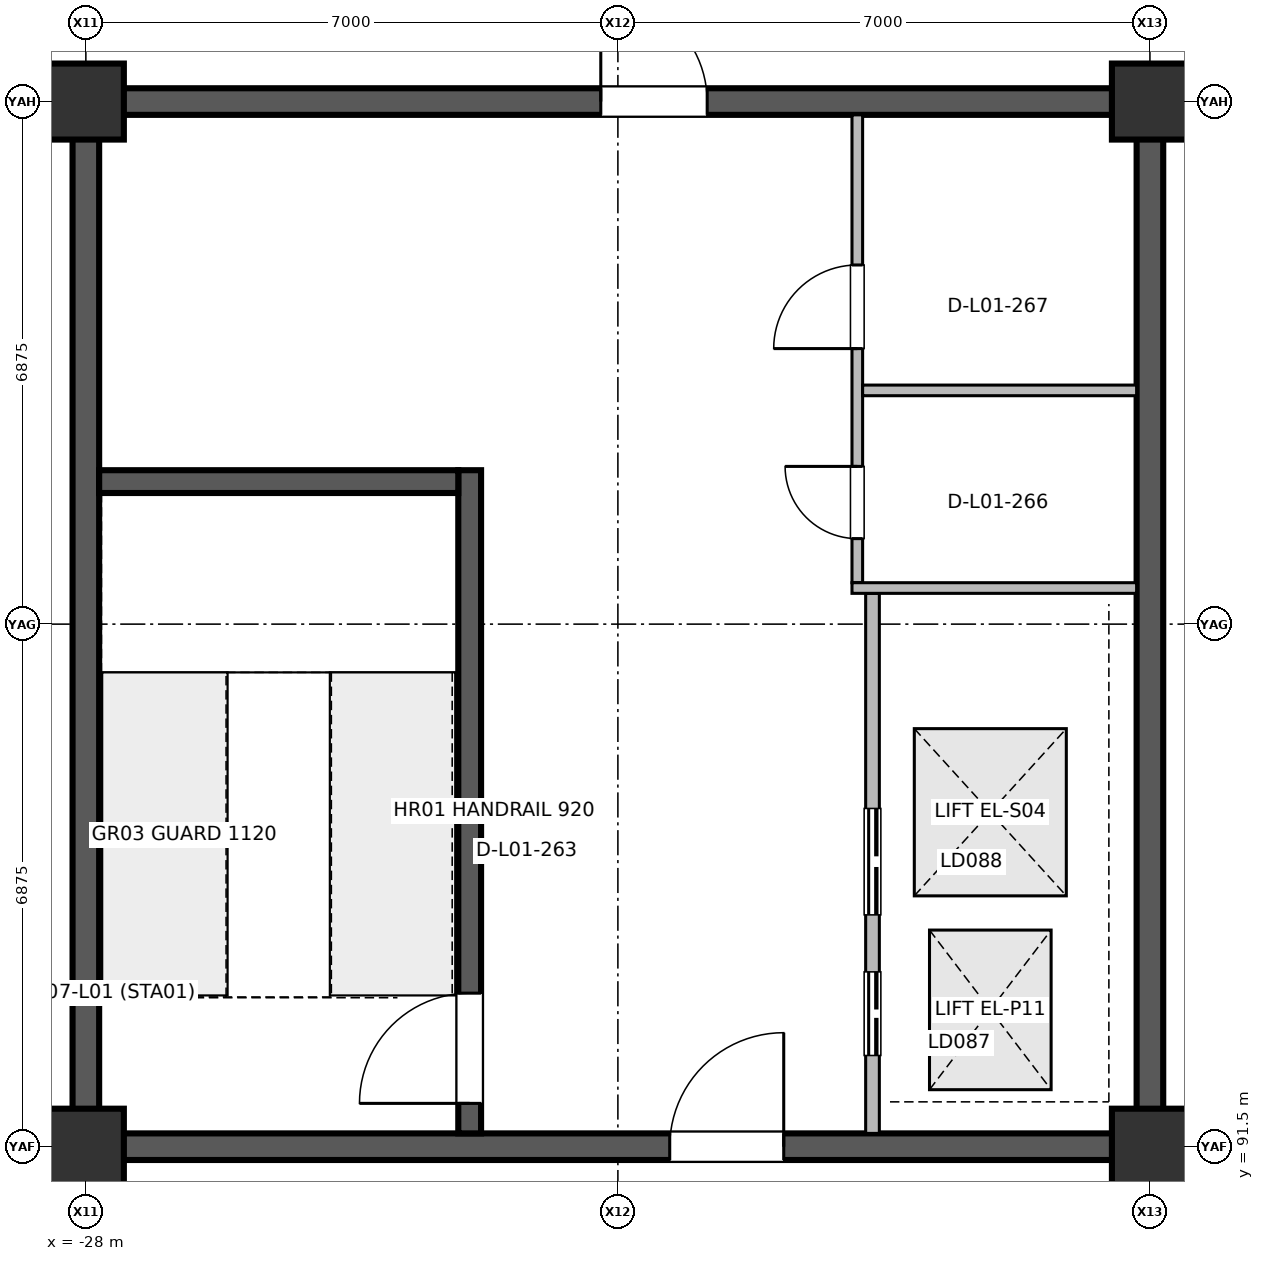
"""IFC4 building model, lengths in metres.
Left out: names, types, materials, properties, quantities, classifications, styles, units other than length and angle.
Written with IfcOpenShell. Run it as: python <this file> out.ifc"""

import sys

from ifc_helpers import new_model, si_unit, direction, frame, frame_2d, origin, origin_2d, place, context, subcontext, project, spatial, rectangle, circle, extrude, element, fill, save


model = new_model("IFC4")
c1 = context("Model", 3, precision=1e-05, world=origin(), true_north=direction((0.0, 1.0)))
c2 = subcontext(c1, "Body", "Model", "MODEL_VIEW")
j1 = project(units=[si_unit("LENGTHUNIT", "METRE"), si_unit("PLANEANGLEUNIT", "RADIAN")], contexts=[c1])
p1 = place(None, origin())
s1 = spatial("IfcSite", under=j1, at=p1, CompositionType="ELEMENT")
p2 = place(p1, origin())
s2 = spatial("IfcBuilding", under=s1, at=p2, CompositionType="ELEMENT")
p3 = place(p2, origin())
s3 = spatial("IfcBuildingStorey", under=s2, at=p3, CompositionType="ELEMENT", Elevation=0.0)
for number, where, z_axis, x_axis in (
    (1, (-28.0, 91.5, 0.0), (0.0, 0.0, 1.0), (1.0, 0.0, 0.0)),
    (2, (-28.0, 105.25, 0.0), (0.0, 0.0, 1.0), (1.0, 0.0, 0.0)),
    (3, (-14.0, 91.5, 0.0), (0.0, 0.0, 1.0), (1.0, 0.0, 0.0)),
    (4, (-14.0, 105.25, 0.0), (0.0, 0.0, 1.0), (1.0, 0.0, 0.0)),
):
    element("IfcColumn", number, at=place(p3, frame(where, z_axis=z_axis, x_axis=x_axis)), inside=s3, PredefinedType="COLUMN", context=c2, shape_type="SweptSolid", body=[
        extrude(circle(Radius=0.5, at=origin_2d()), origin(), (0.0, 0.0, 1.0), 5.998),
    ])
for number, where, z_axis, x_axis in (
    (5, (-28.0, 91.675, 0.0), (0.0, 0.0, 1.0), (0.0, 1.0, 0.0)),
    (6, (-14.0, 91.675, 0.0), (0.0, 0.0, 1.0), (0.0, 1.0, 0.0)),
):
    element("IfcWall", number, at=place(p3, frame(where, z_axis=z_axis, x_axis=x_axis)), inside=s3, PredefinedType="SHEAR", context=c2, shape_type="SweptSolid", body=[
        extrude(rectangle(XDim=13.4, YDim=0.35, at=frame_2d((6.7, 0.0))), origin(), (0.0, 0.0, 1.0), 5.78),
    ])
p4 = place(p3, frame((-27.825, 91.5, 0.0), z_axis=(0.0, 0.0, 1.0), x_axis=(1.0, 0.0, 0.0)))
e7 = element("IfcWall", 7, at=p4, inside=s3, PredefinedType="SHEAR", context=c2, shape_type="SweptSolid", body=[
    extrude(rectangle(XDim=13.65, YDim=0.35, at=frame_2d((6.825, 0.0))), origin(), (0.0, 0.0, 1.0), 5.78),
])
p5 = place(p4, frame((7.507, 0.0, 0.0)))
e8 = element("IfcOpeningElement", 8, at=p5, cuts=e7, PredefinedType="OPENING", context=c2, shape_type="SweptSolid", body=[
    extrude(rectangle(XDim=1.5, YDim=2.2, at=frame_2d((0.75, 1.1))), frame((0.0, 0.185, 0.0), z_axis=(0.0, -1.0, 0.0), x_axis=(1.0, 0.0, 0.0)), (0.0, 0.0, 1.0), 0.37),
])
p6 = place(p3, frame((-27.825, 105.25, 0.0), z_axis=(0.0, 0.0, 1.0), x_axis=(1.0, 0.0, 0.0)))
e9 = element("IfcWall", 9, at=p6, inside=s3, PredefinedType="SHEAR", context=c2, shape_type="SweptSolid", body=[
    extrude(rectangle(XDim=13.65, YDim=0.35, at=frame_2d((6.825, 0.0))), origin(), (0.0, 0.0, 1.0), 5.78),
])
p7 = place(p6, frame((6.6, 0.0, 0.0)))
e10 = element("IfcOpeningElement", 10, at=p7, cuts=e9, PredefinedType="OPENING", context=c2, shape_type="SweptSolid", body=[
    extrude(rectangle(XDim=1.4, YDim=2.2, at=frame_2d((0.7, 1.1))), frame((0.0, 0.185, 0.0), z_axis=(0.0, -1.0, 0.0), x_axis=(1.0, 0.0, 0.0)), (0.0, 0.0, 1.0), 0.37),
])
p8 = place(p3, frame((-22.95, 91.675, 0.0), z_axis=(0.0, 0.0, 1.0), x_axis=(0.0, 1.0, 0.0)))
e11 = element("IfcWall", 11, at=p8, inside=s3, PredefinedType="SHEAR", context=c2, shape_type="SweptSolid", body=[
    extrude(rectangle(XDim=8.725, YDim=0.3, at=frame_2d((4.362, 0.0))), origin(), (0.0, 0.0, 1.0), 5.78),
])
p9 = place(p8, frame((0.395, 0.0, 0.0)))
e12 = element("IfcOpeningElement", 12, at=p9, cuts=e11, PredefinedType="OPENING", context=c2, shape_type="SweptSolid", body=[
    extrude(rectangle(XDim=1.45, YDim=2.2, at=frame_2d((0.725, 1.1))), frame((0.0, 0.16, 0.0), z_axis=(0.0, -1.0, 0.0), x_axis=(1.0, 0.0, 0.0)), (0.0, 0.0, 1.0), 0.32),
])
p10 = place(p3, frame((-17.65, 91.675, 0.0), z_axis=(0.0, 0.0, 1.0), x_axis=(0.0, 1.0, 0.0)))
e13 = element("IfcWall", 13, at=p10, inside=s3, PredefinedType="PARTITIONING", context=c2, shape_type="SweptSolid", body=[
    extrude(rectangle(XDim=7.105, YDim=0.18, at=frame_2d((3.552, 0.0))), origin(), (0.0, 0.0, 1.0), 5.02),
])
p11 = place(p10, frame((1.025, 0.0, 0.0)))
e14 = element("IfcOpeningElement", 14, at=p11, cuts=e13, PredefinedType="OPENING", context=c2, shape_type="SweptSolid", body=[
    extrude(rectangle(XDim=1.1, YDim=2.2, at=frame_2d((0.55, 1.1))), frame((0.0, 0.1, 0.0), z_axis=(0.0, -1.0, 0.0), x_axis=(1.0, 0.0, 0.0)), (0.0, 0.0, 1.0), 0.2),
])
p12 = place(p10, frame((2.875, 0.0, 0.0)))
e15 = element("IfcOpeningElement", 15, at=p12, cuts=e13, PredefinedType="OPENING", context=c2, shape_type="SweptSolid", body=[
    extrude(rectangle(XDim=1.4, YDim=2.3, at=frame_2d((0.7, 1.15))), frame((0.0, 0.1, 0.0), z_axis=(0.0, -1.0, 0.0), x_axis=(1.0, 0.0, 0.0)), (0.0, 0.0, 1.0), 0.2),
])
p13 = place(p3, frame((-17.85, 98.92, 0.0), z_axis=(0.0, 0.0, 1.0), x_axis=(0.0, 1.0, 0.0)))
e16 = element("IfcWall", 16, at=p13, inside=s3, PredefinedType="PARTITIONING", context=c2, shape_type="SweptSolid", body=[
    extrude(rectangle(XDim=6.155, YDim=0.14, at=frame_2d((3.078, 0.0))), origin(), (0.0, 0.0, 1.0), 5.02),
])
p14 = place(p13, frame((0.58, 0.0, 0.0)))
e17 = element("IfcOpeningElement", 17, at=p14, cuts=e16, PredefinedType="OPENING", context=c2, shape_type="SweptSolid", body=[
    extrude(rectangle(XDim=0.95, YDim=2.15, at=frame_2d((0.475, 1.075))), frame((0.0, 0.08, 0.0), z_axis=(0.0, -1.0, 0.0), x_axis=(1.0, 0.0, 0.0)), (0.0, 0.0, 1.0), 0.16),
])
p15 = place(p13, frame((3.08, 0.0, 0.0)))
e18 = element("IfcOpeningElement", 18, at=p15, cuts=e16, PredefinedType="OPENING", context=c2, shape_type="SweptSolid", body=[
    extrude(rectangle(XDim=1.1, YDim=2.15, at=frame_2d((0.55, 1.075))), frame((0.0, 0.08, 0.0), z_axis=(0.0, -1.0, 0.0), x_axis=(1.0, 0.0, 0.0)), (0.0, 0.0, 1.0), 0.16),
])
p16 = place(p3, frame((-17.92, 98.85, 0.0), z_axis=(0.0, 0.0, 1.0), x_axis=(1.0, 0.0, 0.0)))
e19 = element("IfcWall", 19, at=p16, inside=s3, PredefinedType="PARTITIONING", context=c2, shape_type="SweptSolid", body=[
    extrude(rectangle(XDim=3.745, YDim=0.14, at=frame_2d((1.873, 0.0))), origin(), (0.0, 0.0, 1.0), 5.02),
])
p17 = place(p3, frame((-17.78, 101.45, 0.0), z_axis=(0.0, 0.0, 1.0), x_axis=(1.0, 0.0, 0.0)))
e20 = element("IfcWall", 20, at=p17, inside=s3, PredefinedType="PARTITIONING", context=c2, shape_type="SweptSolid", body=[
    extrude(rectangle(XDim=3.605, YDim=0.14, at=frame_2d((1.802, 0.0))), origin(), (0.0, 0.0, 1.0), 5.02),
])
p18 = place(p3, frame((-27.825, 100.25, 0.0), z_axis=(0.0, 0.0, 1.0), x_axis=(1.0, 0.0, 0.0)))
e21 = element("IfcWall", 21, at=p18, inside=s3, PredefinedType="SHEAR", context=c2, shape_type="SweptSolid", body=[
    extrude(rectangle(XDim=4.725, YDim=0.3, at=frame_2d((2.362, 0.0))), origin(), (0.0, 0.0, 1.0), 5.78),
])
p19 = place(p7, origin())
e22 = element("IfcDoor", 22, at=p19, inside=s3, OperationType="SINGLE_SWING_LEFT", PredefinedType="DOOR", context=c2, shape_type="SweptSolid", body=[
    extrude(rectangle(XDim=1.4, YDim=2.2, at=frame_2d((0.7, 1.1))), frame((0.0, 0.025, 0.0), z_axis=(0.0, -1.0, 0.0), x_axis=(1.0, 0.0, 0.0)), (0.0, 0.0, 1.0), 0.05),
])
fill(e10, e22)
p20 = place(p5, origin())
e23 = element("IfcDoor", 23, at=p20, inside=s3, OperationType="SINGLE_SWING_RIGHT", PredefinedType="DOOR", context=c2, shape_type="SweptSolid", body=[
    extrude(rectangle(XDim=1.5, YDim=2.2, at=frame_2d((0.75, 1.1))), frame((0.0, 0.025, 0.0), z_axis=(0.0, -1.0, 0.0), x_axis=(1.0, 0.0, 0.0)), (0.0, 0.0, 1.0), 0.05),
])
fill(e8, e23)
p21 = place(p9, origin())
e24 = element("IfcDoor", 24, at=p21, inside=s3, OperationType="SINGLE_SWING_LEFT", PredefinedType="DOOR", context=c2, shape_type="SweptSolid", body=[
    extrude(rectangle(XDim=1.45, YDim=2.2, at=frame_2d((0.725, 1.1))), frame((0.0, 0.025, 0.0), z_axis=(0.0, -1.0, 0.0), x_axis=(1.0, 0.0, 0.0)), (0.0, 0.0, 1.0), 0.05),
])
fill(e12, e24)
p22 = place(p11, origin())
e25 = element("IfcDoor", 25, at=p22, inside=s3, OperationType="DOUBLE_DOOR_SLIDING", PredefinedType="DOOR", context=c2, shape_type="SweptSolid", body=[
    extrude(rectangle(XDim=1.1, YDim=2.2, at=frame_2d((0.55, 1.1))), frame((0.0, 0.025, 0.0), z_axis=(0.0, -1.0, 0.0), x_axis=(1.0, 0.0, 0.0)), (0.0, 0.0, 1.0), 0.05),
])
fill(e14, e25)
p23 = place(p12, origin())
e26 = element("IfcDoor", 26, at=p23, inside=s3, OperationType="DOUBLE_DOOR_SLIDING", PredefinedType="DOOR", context=c2, shape_type="SweptSolid", body=[
    extrude(rectangle(XDim=1.4, YDim=2.3, at=frame_2d((0.7, 1.15))), frame((0.0, 0.025, 0.0), z_axis=(0.0, -1.0, 0.0), x_axis=(1.0, 0.0, 0.0)), (0.0, 0.0, 1.0), 0.05),
])
fill(e15, e26)
p24 = place(p14, origin())
e27 = element("IfcDoor", 27, at=p24, inside=s3, OperationType="SINGLE_SWING_RIGHT", PredefinedType="DOOR", context=c2, shape_type="SweptSolid", body=[
    extrude(rectangle(XDim=0.95, YDim=2.15, at=frame_2d((0.475, 1.075))), frame((0.0, 0.025, 0.0), z_axis=(0.0, -1.0, 0.0), x_axis=(1.0, 0.0, 0.0)), (0.0, 0.0, 1.0), 0.05),
])
fill(e17, e27)
p25 = place(p15, origin())
e28 = element("IfcDoor", 28, at=p25, inside=s3, OperationType="SINGLE_SWING_LEFT", PredefinedType="DOOR", context=c2, shape_type="SweptSolid", body=[
    extrude(rectangle(XDim=1.1, YDim=2.15, at=frame_2d((0.55, 1.075))), frame((0.0, 0.025, 0.0), z_axis=(0.0, -1.0, 0.0), x_axis=(1.0, 0.0, 0.0)), (0.0, 0.0, 1.0), 0.05),
])
fill(e18, e28)
save(model, sys.argv[1])
